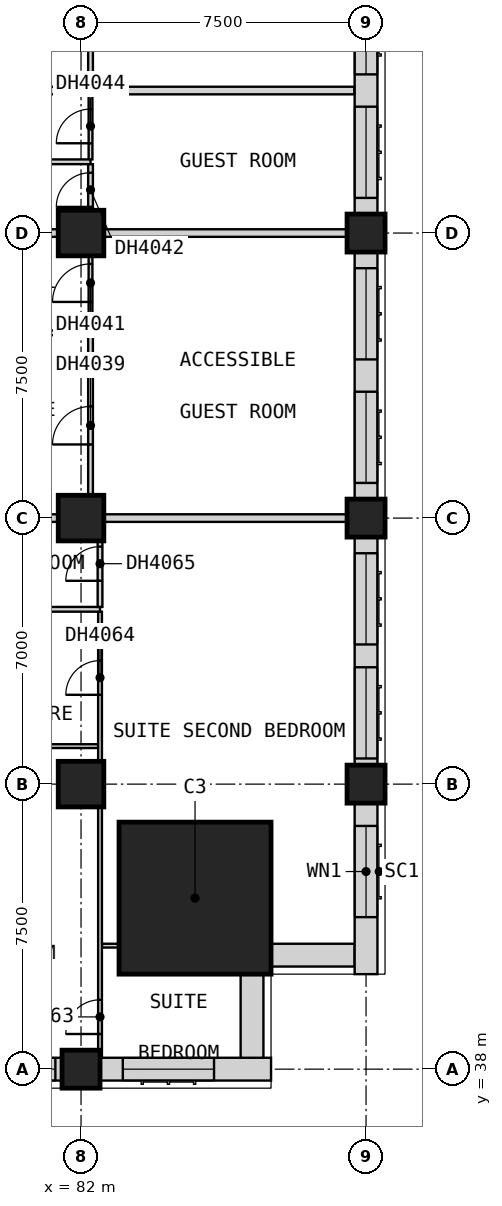
"""IFC4 building model, lengths in metres.
Left out: names, types, materials, properties, quantities, classifications, styles, units other than length and angle.
Written with IfcOpenShell. Run it as: python <this file> out.ifc"""

import sys

from ifc_helpers import new_model, si_unit, direction, frame, frame_2d, origin, origin_2d, place, context, subcontext, project, spatial, rectangle, extrude, element, fill, save


model = new_model("IFC4")
c1 = context("Model", 3, precision=1e-05, world=origin(), true_north=direction((0.0, 1.0)))
c2 = subcontext(c1, "Body", "Model", "MODEL_VIEW")
j1 = project(units=[si_unit("LENGTHUNIT", "METRE"), si_unit("PLANEANGLEUNIT", "RADIAN")], contexts=[c1])
p1 = place(None, origin())
s1 = spatial("IfcSite", under=j1, at=p1, CompositionType="ELEMENT")
p2 = place(p1, origin())
s2 = spatial("IfcBuilding", under=s1, at=p2, CompositionType="ELEMENT")
p3 = place(p2, frame((0.0, 0.0, 44.8)))
s3 = spatial("IfcBuildingStorey", under=s2, at=p3, CompositionType="ELEMENT", Elevation=44.8)
p4 = place(p3, frame((82.0, 38.0, 0.0), z_axis=(0.0, 0.0, 1.0), x_axis=(1.0, 0.0, 0.0)))
e1 = element("IfcColumn", 1, at=p4, inside=s3, PredefinedType="COLUMN", context=c2, shape_type="SweptSolid", body=[
    extrude(rectangle(XDim=1.0, YDim=1.0, at=origin_2d()), origin(), (0.0, 0.0, 1.0), 3.6),
])
for number, where, z_axis, x_axis in (
    (2, (82.0, 45.5, 0.0), (0.0, 0.0, 1.0), (1.0, 0.0, 0.0)),
    (3, (82.0, 52.5, 0.0), (0.0, 0.0, 1.0), (1.0, 0.0, 0.0)),
    (4, (82.0, 60.0, 0.0), (0.0, 0.0, 1.0), (1.0, 0.0, 0.0)),
):
    element("IfcColumn", number, at=place(p3, frame(where, z_axis=z_axis, x_axis=x_axis)), inside=s3, PredefinedType="COLUMN", context=c2, shape_type="SweptSolid", body=[
        extrude(rectangle(XDim=1.2, YDim=1.2, at=origin_2d()), origin(), (0.0, 0.0, 1.0), 3.6),
    ])
for number, where, z_axis, x_axis in (
    (5, (89.5, 45.5, 0.0), (0.0, 0.0, 1.0), (1.0, 0.0, 0.0)),
    (6, (89.5, 52.5, 0.0), (0.0, 0.0, 1.0), (1.0, 0.0, 0.0)),
    (7, (89.5, 60.0, 0.0), (0.0, 0.0, 1.0), (1.0, 0.0, 0.0)),
):
    element("IfcColumn", number, at=place(p3, frame(where, z_axis=z_axis, x_axis=x_axis)), inside=s3, PredefinedType="COLUMN", context=c2, shape_type="SweptSolid", body=[
        extrude(rectangle(XDim=1.0, YDim=1.0, at=origin_2d()), origin(), (0.0, 0.0, 1.0), 3.6),
    ])
p5 = place(p3, frame((85.0, 42.5, 0.0), z_axis=(0.0, 0.0, 1.0), x_axis=(1.0, 0.0, 0.0)))
e8 = element("IfcColumn", 8, at=p5, inside=s3, PredefinedType="COLUMN", context=c2, shape_type="SweptSolid", body=[
    extrude(rectangle(XDim=4.0, YDim=4.0, at=origin_2d()), origin(), (0.0, 0.0, 1.0), 3.6),
])
p6 = place(p3, frame((75.0, 38.0, 0.0), z_axis=(0.0, 0.0, 1.0), x_axis=(1.0, 0.0, 0.0)))
e9 = element("IfcWall", 9, at=p6, inside=s3, PredefinedType="SOLIDWALL", context=c2, shape_type="SweptSolid", body=[
    extrude(rectangle(XDim=6.5, YDim=0.6, at=frame_2d((3.25, 0.0))), origin(), (0.0, 0.0, 1.0), 2.85),
])
p7 = place(p6, frame((0.675, 0.0, 0.8)))
e10 = element("IfcOpeningElement", 10, at=p7, cuts=e9, PredefinedType="OPENING", context=c2, shape_type="SweptSolid", body=[
    extrude(rectangle(XDim=2.4, YDim=1.8, at=frame_2d((1.2, 0.9))), frame((0.0, 0.31, 0.0), z_axis=(0.0, -1.0, 0.0), x_axis=(1.0, 0.0, 0.0)), (0.0, 0.0, 1.0), 0.62),
])
p8 = place(p6, frame((3.925, 0.0, 0.8)))
e11 = element("IfcOpeningElement", 11, at=p8, cuts=e9, PredefinedType="OPENING", context=c2, shape_type="SweptSolid", body=[
    extrude(rectangle(XDim=2.4, YDim=1.8, at=frame_2d((1.2, 0.9))), frame((0.0, 0.31, 0.0), z_axis=(0.0, -1.0, 0.0), x_axis=(1.0, 0.0, 0.0)), (0.0, 0.0, 1.0), 0.62),
])
p9 = place(p3, frame((82.5, 38.0, 0.0), z_axis=(0.0, 0.0, 1.0), x_axis=(1.0, 0.0, 0.0)))
e12 = element("IfcWall", 12, at=p9, inside=s3, PredefinedType="SOLIDWALL", context=c2, shape_type="SweptSolid", body=[
    extrude(rectangle(XDim=4.5, YDim=0.6, at=frame_2d((2.25, 0.0))), origin(), (0.0, 0.0, 1.0), 3.35),
])
p10 = place(p9, frame((0.6, 0.0, 0.8)))
e13 = element("IfcOpeningElement", 13, at=p10, cuts=e12, PredefinedType="OPENING", context=c2, shape_type="SweptSolid", body=[
    extrude(rectangle(XDim=2.4, YDim=1.8, at=frame_2d((1.2, 0.9))), frame((0.0, 0.31, 0.0), z_axis=(0.0, -1.0, 0.0), x_axis=(1.0, 0.0, 0.0)), (0.0, 0.0, 1.0), 0.62),
])
for number, where, z_axis, x_axis in (
    (14, (86.5, 38.3, 0.0), (0.0, 0.0, 1.0), (0.0, 1.0, 0.0)),
    (15, (87.0, 41.0, 0.0), (0.0, 0.0, 1.0), (1.0, 0.0, 0.0)),
):
    element("IfcWall", number, at=place(p3, frame(where, z_axis=z_axis, x_axis=x_axis)), inside=s3, PredefinedType="SOLIDWALL", context=c2, shape_type="SweptSolid", body=[
        extrude(rectangle(XDim=2.2, YDim=0.6, at=frame_2d((1.1, 0.0))), origin(), (0.0, 0.0, 1.0), 3.35),
    ])
p11 = place(p3, frame((89.5, 40.5, 0.0), z_axis=(0.0, 0.0, 1.0), x_axis=(0.0, 1.0, 0.0)))
e16 = element("IfcWall", 16, at=p11, inside=s3, PredefinedType="SOLIDWALL", context=c2, shape_type="SweptSolid", body=[
    extrude(rectangle(XDim=4.5, YDim=0.6, at=frame_2d((2.25, 0.0))), origin(), (0.0, 0.0, 1.0), 3.35),
])
p12 = place(p11, frame((1.5, 0.0, 0.8)))
e17 = element("IfcOpeningElement", 17, at=p12, cuts=e16, PredefinedType="OPENING", context=c2, shape_type="SweptSolid", body=[
    extrude(rectangle(XDim=2.4, YDim=1.8, at=frame_2d((1.2, 0.9))), frame((0.0, 0.31, 0.0), z_axis=(0.0, -1.0, 0.0), x_axis=(1.0, 0.0, 0.0)), (0.0, 0.0, 1.0), 0.62),
])
p13 = place(p3, frame((89.5, 46.0, 0.0), z_axis=(0.0, 0.0, 1.0), x_axis=(0.0, 1.0, 0.0)))
e18 = element("IfcWall", 18, at=p13, inside=s3, PredefinedType="SOLIDWALL", context=c2, shape_type="SweptSolid", body=[
    extrude(rectangle(XDim=6.0, YDim=0.6, at=frame_2d((3.0, 0.0))), origin(), (0.0, 0.0, 1.0), 2.85),
])
p14 = place(p13, frame((0.175, 0.0, 0.8)))
e19 = element("IfcOpeningElement", 19, at=p14, cuts=e18, PredefinedType="OPENING", context=c2, shape_type="SweptSolid", body=[
    extrude(rectangle(XDim=2.4, YDim=1.8, at=frame_2d((1.2, 0.9))), frame((0.0, 0.31, 0.0), z_axis=(0.0, -1.0, 0.0), x_axis=(1.0, 0.0, 0.0)), (0.0, 0.0, 1.0), 0.62),
])
p15 = place(p13, frame((3.175, 0.0, 0.8)))
e20 = element("IfcOpeningElement", 20, at=p15, cuts=e18, PredefinedType="OPENING", context=c2, shape_type="SweptSolid", body=[
    extrude(rectangle(XDim=2.4, YDim=1.8, at=frame_2d((1.2, 0.9))), frame((0.0, 0.31, 0.0), z_axis=(0.0, -1.0, 0.0), x_axis=(1.0, 0.0, 0.0)), (0.0, 0.0, 1.0), 0.62),
])
p16 = place(p3, frame((89.5, 53.0, 0.0), z_axis=(0.0, 0.0, 1.0), x_axis=(0.0, 1.0, 0.0)))
e21 = element("IfcWall", 21, at=p16, inside=s3, PredefinedType="SOLIDWALL", context=c2, shape_type="SweptSolid", body=[
    extrude(rectangle(XDim=6.5, YDim=0.6, at=frame_2d((3.25, 0.0))), origin(), (0.0, 0.0, 1.0), 2.85),
])
p17 = place(p16, frame((0.425, 0.0, 0.8)))
e22 = element("IfcOpeningElement", 22, at=p17, cuts=e21, PredefinedType="OPENING", context=c2, shape_type="SweptSolid", body=[
    extrude(rectangle(XDim=2.4, YDim=1.8, at=frame_2d((1.2, 0.9))), frame((0.0, 0.31, 0.0), z_axis=(0.0, -1.0, 0.0), x_axis=(1.0, 0.0, 0.0)), (0.0, 0.0, 1.0), 0.62),
])
p18 = place(p16, frame((3.675, 0.0, 0.8)))
e23 = element("IfcOpeningElement", 23, at=p18, cuts=e21, PredefinedType="OPENING", context=c2, shape_type="SweptSolid", body=[
    extrude(rectangle(XDim=2.4, YDim=1.8, at=frame_2d((1.2, 0.9))), frame((0.0, 0.31, 0.0), z_axis=(0.0, -1.0, 0.0), x_axis=(1.0, 0.0, 0.0)), (0.0, 0.0, 1.0), 0.62),
])
p19 = place(p3, frame((89.5, 60.5, 0.0), z_axis=(0.0, 0.0, 1.0), x_axis=(0.0, 1.0, 0.0)))
e24 = element("IfcWall", 24, at=p19, inside=s3, PredefinedType="SOLIDWALL", context=c2, shape_type="SweptSolid", body=[
    extrude(rectangle(XDim=6.5, YDim=0.6, at=frame_2d((3.25, 0.0))), origin(), (0.0, 0.0, 1.0), 2.85),
])
p20 = place(p19, frame((0.425, 0.0, 0.8)))
e25 = element("IfcOpeningElement", 25, at=p20, cuts=e24, PredefinedType="OPENING", context=c2, shape_type="SweptSolid", body=[
    extrude(rectangle(XDim=2.4, YDim=1.8, at=frame_2d((1.2, 0.9))), frame((0.0, 0.31, 0.0), z_axis=(0.0, -1.0, 0.0), x_axis=(1.0, 0.0, 0.0)), (0.0, 0.0, 1.0), 0.62),
])
p21 = place(p19, frame((3.675, 0.0, 0.8)))
e26 = element("IfcOpeningElement", 26, at=p21, cuts=e24, PredefinedType="OPENING", context=c2, shape_type="SweptSolid", body=[
    extrude(rectangle(XDim=2.4, YDim=1.8, at=frame_2d((1.2, 0.9))), frame((0.0, 0.31, 0.0), z_axis=(0.0, -1.0, 0.0), x_axis=(1.0, 0.0, 0.0)), (0.0, 0.0, 1.0), 0.62),
])
for number, where, z_axis, x_axis in (
    (27, (77.475, 52.5, 0.0), (0.0, 0.0, 1.0), (1.0, 0.0, 0.0)),
    (28, (77.475, 60.0, 0.0), (0.0, 0.0, 1.0), (1.0, 0.0, 0.0)),
):
    element("IfcWall", number, at=place(p3, frame(where, z_axis=z_axis, x_axis=x_axis)), inside=s3, PredefinedType="PARTITIONING", context=c2, shape_type="SweptSolid", body=[
        extrude(rectangle(XDim=12.525, YDim=0.2, at=frame_2d((6.262, 0.0))), origin(), (0.0, 0.0, 1.0), 3.35),
    ])
p22 = place(p3, frame((77.475, 63.75, 0.0), z_axis=(0.0, 0.0, 1.0), x_axis=(1.0, 0.0, 0.0)))
e29 = element("IfcWall", 29, at=p22, inside=s3, PredefinedType="PARTITIONING", context=c2, shape_type="SweptSolid", body=[
    extrude(rectangle(XDim=11.715, YDim=0.2, at=frame_2d((5.857, 0.0))), origin(), (0.0, 0.0, 1.0), 3.35),
])
p23 = place(p3, frame((82.55, 41.25, 0.0), z_axis=(0.0, 0.0, 1.0), x_axis=(1.0, 0.0, 0.0)))
e30 = element("IfcWall", 30, at=p23, inside=s3, PredefinedType="PARTITIONING", context=c2, shape_type="SweptSolid", body=[
    extrude(rectangle(XDim=4.44, YDim=0.1, at=frame_2d((2.22, 0.0))), origin(), (0.0, 0.0, 1.0), 3.35),
])
p24 = place(p3, frame((75.1, 46.5, 0.0), z_axis=(0.0, 0.0, 1.0), x_axis=(1.0, 0.0, 0.0)))
e31 = element("IfcWall", 31, at=p24, inside=s3, PredefinedType="PARTITIONING", context=c2, shape_type="SweptSolid", body=[
    extrude(rectangle(XDim=7.35, YDim=0.1, at=frame_2d((3.675, 0.0))), origin(), (0.0, 0.0, 1.0), 3.35),
])
p25 = place(p24, frame((0.65, 0.0, 0.0)))
e32 = element("IfcOpeningElement", 32, at=p25, cuts=e31, PredefinedType="OPENING", context=c2, shape_type="SweptSolid", body=[
    extrude(rectangle(XDim=0.9, YDim=2.1, at=frame_2d((0.45, 1.05))), frame((0.0, 0.06, 0.0), z_axis=(0.0, -1.0, 0.0), x_axis=(1.0, 0.0, 0.0)), (0.0, 0.0, 1.0), 0.12),
])
p26 = place(p3, frame((82.25, 57.438, 0.0), z_axis=(0.0, 0.0, 1.0), x_axis=(0.0, 1.0, 0.0)))
e33 = element("IfcWall", 33, at=p26, inside=s3, PredefinedType="PARTITIONING", context=c2, shape_type="SweptSolid", body=[
    extrude(rectangle(XDim=2.462, YDim=0.1, at=frame_2d((1.231, 0.0))), origin(), (0.0, 0.0, 1.0), 3.35),
])
p27 = place(p26, frame((0.75, 0.0, 0.0)))
e34 = element("IfcOpeningElement", 34, at=p27, cuts=e33, PredefinedType="OPENING", context=c2, shape_type="SweptSolid", body=[
    extrude(rectangle(XDim=1.0, YDim=2.1, at=frame_2d((0.5, 1.05))), frame((0.0, 0.06, 0.0), z_axis=(0.0, -1.0, 0.0), x_axis=(1.0, 0.0, 0.0)), (0.0, 0.0, 1.0), 0.12),
])
p28 = place(p3, frame((82.25, 61.938, 0.0), z_axis=(0.0, 0.0, 1.0), x_axis=(0.0, 1.0, 0.0)))
e35 = element("IfcWall", 35, at=p28, inside=s3, PredefinedType="PARTITIONING", context=c2, shape_type="SweptSolid", body=[
    extrude(rectangle(XDim=1.712, YDim=0.1, at=frame_2d((0.856, 0.0))), origin(), (0.0, 0.0, 1.0), 3.35),
])
p29 = place(p28, frame((0.425, 0.0, 0.0)))
e36 = element("IfcOpeningElement", 36, at=p29, cuts=e35, PredefinedType="OPENING", context=c2, shape_type="SweptSolid", body=[
    extrude(rectangle(XDim=0.9, YDim=2.1, at=frame_2d((0.45, 1.05))), frame((0.0, 0.06, 0.0), z_axis=(0.0, -1.0, 0.0), x_axis=(1.0, 0.0, 0.0)), (0.0, 0.0, 1.0), 0.12),
])
p30 = place(p3, frame((82.5, 38.31, 0.0), z_axis=(0.0, 0.0, 1.0), x_axis=(0.0, 1.0, 0.0)))
e37 = element("IfcWall", 37, at=p30, inside=s3, PredefinedType="PARTITIONING", context=c2, shape_type="SweptSolid", body=[
    extrude(rectangle(XDim=11.728, YDim=0.1, at=frame_2d((5.864, 0.0))), origin(), (0.0, 0.0, 1.0), 3.35),
])
p31 = place(p30, frame((0.615, 0.0, 0.0)))
e38 = element("IfcOpeningElement", 38, at=p31, cuts=e37, PredefinedType="OPENING", context=c2, shape_type="SweptSolid", body=[
    extrude(rectangle(XDim=0.9, YDim=2.1, at=frame_2d((0.45, 1.05))), frame((0.0, 0.06, 0.0), z_axis=(0.0, -1.0, 0.0), x_axis=(1.0, 0.0, 0.0)), (0.0, 0.0, 1.0), 0.12),
])
p32 = place(p30, frame((9.54, 0.0, 0.0)))
e39 = element("IfcOpeningElement", 39, at=p32, cuts=e37, PredefinedType="OPENING", context=c2, shape_type="SweptSolid", body=[
    extrude(rectangle(XDim=0.9, YDim=2.1, at=frame_2d((0.45, 1.05))), frame((0.0, 0.06, 0.0), z_axis=(0.0, -1.0, 0.0), x_axis=(1.0, 0.0, 0.0)), (0.0, 0.0, 1.0), 0.12),
])
p33 = place(p3, frame((77.475, 50.1, 0.0), z_axis=(0.0, 0.0, 1.0), x_axis=(1.0, 0.0, 0.0)))
e40 = element("IfcWall", 40, at=p33, inside=s3, PredefinedType="PARTITIONING", context=c2, shape_type="SweptSolid", body=[
    extrude(rectangle(XDim=5.025, YDim=0.125, at=frame_2d((2.512, 0.0))), origin(), (0.0, 0.0, 1.0), 3.35),
])
for number, where, z_axis, x_axis in (
    (41, (77.475, 57.375, 0.0), (0.0, 0.0, 1.0), (1.0, 0.0, 0.0)),
    (42, (77.475, 61.875, 0.0), (0.0, 0.0, 1.0), (1.0, 0.0, 0.0)),
):
    element("IfcWall", number, at=place(p3, frame(where, z_axis=z_axis, x_axis=x_axis)), inside=s3, PredefinedType="PARTITIONING", context=c2, shape_type="SweptSolid", body=[
        extrude(rectangle(XDim=4.775, YDim=0.125, at=frame_2d((2.387, 0.0))), origin(), (0.0, 0.0, 1.0), 3.35),
    ])
p34 = place(p3, frame((82.25, 52.6, 0.0), z_axis=(0.0, 0.0, 1.0), x_axis=(0.0, 1.0, 0.0)))
e43 = element("IfcWall", 43, at=p34, inside=s3, PredefinedType="PARTITIONING", context=c2, shape_type="SweptSolid", body=[
    extrude(rectangle(XDim=4.712, YDim=0.125, at=frame_2d((2.356, 0.0))), origin(), (0.0, 0.0, 1.0), 3.35),
])
p35 = place(p34, frame((1.837, 0.0, 0.0)))
e44 = element("IfcOpeningElement", 44, at=p35, cuts=e43, PredefinedType="OPENING", context=c2, shape_type="SweptSolid", body=[
    extrude(rectangle(XDim=1.0, YDim=2.1, at=frame_2d((0.5, 1.05))), frame((0.0, 0.073, 0.0), z_axis=(0.0, -1.0, 0.0), x_axis=(1.0, 0.0, 0.0)), (0.0, 0.0, 1.0), 0.145),
])
p36 = place(p3, frame((82.25, 60.1, 0.0), z_axis=(0.0, 0.0, 1.0), x_axis=(0.0, 1.0, 0.0)))
e45 = element("IfcWall", 45, at=p36, inside=s3, PredefinedType="PARTITIONING", context=c2, shape_type="SweptSolid", body=[
    extrude(rectangle(XDim=1.712, YDim=0.125, at=frame_2d((0.856, 0.0))), origin(), (0.0, 0.0, 1.0), 3.35),
])
p37 = place(p36, frame((0.587, 0.0, 0.0)))
e46 = element("IfcOpeningElement", 46, at=p37, cuts=e45, PredefinedType="OPENING", context=c2, shape_type="SweptSolid", body=[
    extrude(rectangle(XDim=0.9, YDim=2.1, at=frame_2d((0.45, 1.05))), frame((0.0, 0.073, 0.0), z_axis=(0.0, -1.0, 0.0), x_axis=(1.0, 0.0, 0.0)), (0.0, 0.0, 1.0), 0.145),
])
p38 = place(p3, frame((82.25, 63.85, 0.0), z_axis=(0.0, 0.0, 1.0), x_axis=(0.0, 1.0, 0.0)))
e47 = element("IfcWall", 47, at=p38, inside=s3, PredefinedType="PARTITIONING", context=c2, shape_type="SweptSolid", body=[
    extrude(rectangle(XDim=4.337, YDim=0.125, at=frame_2d((2.169, 0.0))), origin(), (0.0, 0.0, 1.0), 3.35),
])
p39 = place(p38, frame((1.7, 0.0, 0.0)))
e48 = element("IfcOpeningElement", 48, at=p39, cuts=e47, PredefinedType="OPENING", context=c2, shape_type="SweptSolid", body=[
    extrude(rectangle(XDim=0.9, YDim=2.1, at=frame_2d((0.45, 1.05))), frame((0.0, 0.073, 0.0), z_axis=(0.0, -1.0, 0.0), x_axis=(1.0, 0.0, 0.0)), (0.0, 0.0, 1.0), 0.145),
])
p40 = place(p3, frame((82.5, 50.163, 0.0), z_axis=(0.0, 0.0, 1.0), x_axis=(0.0, 1.0, 0.0)))
e49 = element("IfcWall", 49, at=p40, inside=s3, PredefinedType="PARTITIONING", context=c2, shape_type="SweptSolid", body=[
    extrude(rectangle(XDim=2.237, YDim=0.125, at=frame_2d((1.119, 0.0))), origin(), (0.0, 0.0, 1.0), 3.35),
])
p41 = place(p40, frame((0.688, 0.0, 0.0)))
e50 = element("IfcOpeningElement", 50, at=p41, cuts=e49, PredefinedType="OPENING", context=c2, shape_type="SweptSolid", body=[
    extrude(rectangle(XDim=0.9, YDim=2.1, at=frame_2d((0.45, 1.05))), frame((0.0, 0.073, 0.0), z_axis=(0.0, -1.0, 0.0), x_axis=(1.0, 0.0, 0.0)), (0.0, 0.0, 1.0), 0.145),
])
p42 = place(p8, origin())
e51 = element("IfcWindow", 51, at=p42, inside=s3, PartitioningType="SINGLE_PANEL", PredefinedType="WINDOW", context=c2, shape_type="SweptSolid", body=[
    extrude(rectangle(XDim=2.4, YDim=1.8, at=frame_2d((1.2, 0.9))), frame((0.0, -0.07, 0.0), z_axis=(0.0, -1.0, 0.0), x_axis=(1.0, 0.0, 0.0)), (0.0, 0.0, 1.0), 0.06),
])
fill(e11, e51)
p43 = place(p10, origin())
e52 = element("IfcWindow", 52, at=p43, inside=s3, PartitioningType="SINGLE_PANEL", PredefinedType="WINDOW", context=c2, shape_type="SweptSolid", body=[
    extrude(rectangle(XDim=2.4, YDim=1.8, at=frame_2d((1.2, 0.9))), frame((0.0, -0.07, 0.0), z_axis=(0.0, -1.0, 0.0), x_axis=(1.0, 0.0, 0.0)), (0.0, 0.0, 1.0), 0.06),
])
fill(e13, e52)
p44 = place(p12, origin())
e53 = element("IfcWindow", 53, at=p44, inside=s3, PartitioningType="SINGLE_PANEL", PredefinedType="WINDOW", context=c2, shape_type="SweptSolid", body=[
    extrude(rectangle(XDim=2.4, YDim=1.8, at=frame_2d((1.2, 0.9))), frame((0.0, -0.07, 0.0), z_axis=(0.0, -1.0, 0.0), x_axis=(1.0, 0.0, 0.0)), (0.0, 0.0, 1.0), 0.06),
])
fill(e17, e53)
p45 = place(p14, origin())
e54 = element("IfcWindow", 54, at=p45, inside=s3, PartitioningType="SINGLE_PANEL", PredefinedType="WINDOW", context=c2, shape_type="SweptSolid", body=[
    extrude(rectangle(XDim=2.4, YDim=1.8, at=frame_2d((1.2, 0.9))), frame((0.0, -0.07, 0.0), z_axis=(0.0, -1.0, 0.0), x_axis=(1.0, 0.0, 0.0)), (0.0, 0.0, 1.0), 0.06),
])
fill(e19, e54)
p46 = place(p15, origin())
e55 = element("IfcWindow", 55, at=p46, inside=s3, PartitioningType="SINGLE_PANEL", PredefinedType="WINDOW", context=c2, shape_type="SweptSolid", body=[
    extrude(rectangle(XDim=2.4, YDim=1.8, at=frame_2d((1.2, 0.9))), frame((0.0, -0.07, 0.0), z_axis=(0.0, -1.0, 0.0), x_axis=(1.0, 0.0, 0.0)), (0.0, 0.0, 1.0), 0.06),
])
fill(e20, e55)
p47 = place(p17, origin())
e56 = element("IfcWindow", 56, at=p47, inside=s3, PartitioningType="SINGLE_PANEL", PredefinedType="WINDOW", context=c2, shape_type="SweptSolid", body=[
    extrude(rectangle(XDim=2.4, YDim=1.8, at=frame_2d((1.2, 0.9))), frame((0.0, -0.07, 0.0), z_axis=(0.0, -1.0, 0.0), x_axis=(1.0, 0.0, 0.0)), (0.0, 0.0, 1.0), 0.06),
])
fill(e22, e56)
p48 = place(p18, origin())
e57 = element("IfcWindow", 57, at=p48, inside=s3, PartitioningType="SINGLE_PANEL", PredefinedType="WINDOW", context=c2, shape_type="SweptSolid", body=[
    extrude(rectangle(XDim=2.4, YDim=1.8, at=frame_2d((1.2, 0.9))), frame((0.0, -0.07, 0.0), z_axis=(0.0, -1.0, 0.0), x_axis=(1.0, 0.0, 0.0)), (0.0, 0.0, 1.0), 0.06),
])
fill(e23, e57)
p49 = place(p20, origin())
e58 = element("IfcWindow", 58, at=p49, inside=s3, PartitioningType="SINGLE_PANEL", PredefinedType="WINDOW", context=c2, shape_type="SweptSolid", body=[
    extrude(rectangle(XDim=2.4, YDim=1.8, at=frame_2d((1.2, 0.9))), frame((0.0, -0.07, 0.0), z_axis=(0.0, -1.0, 0.0), x_axis=(1.0, 0.0, 0.0)), (0.0, 0.0, 1.0), 0.06),
])
fill(e25, e58)
p50 = place(p21, origin())
e59 = element("IfcWindow", 59, at=p50, inside=s3, PartitioningType="SINGLE_PANEL", PredefinedType="WINDOW", context=c2, shape_type="SweptSolid", body=[
    extrude(rectangle(XDim=2.4, YDim=1.8, at=frame_2d((1.2, 0.9))), frame((0.0, -0.07, 0.0), z_axis=(0.0, -1.0, 0.0), x_axis=(1.0, 0.0, 0.0)), (0.0, 0.0, 1.0), 0.06),
])
fill(e26, e59)
p51 = place(p35, origin())
e60 = element("IfcDoor", 60, at=p51, inside=s3, OperationType="SINGLE_SWING_LEFT", PredefinedType="DOOR", context=c2, shape_type="SweptSolid", body=[
    extrude(rectangle(XDim=1.0, YDim=2.1, at=frame_2d((0.5, 1.05))), frame((0.0, 0.025, 0.0), z_axis=(0.0, -1.0, 0.0), x_axis=(1.0, 0.0, 0.0)), (0.0, 0.0, 1.0), 0.05),
])
fill(e44, e60)
p52 = place(p27, origin())
e61 = element("IfcDoor", 61, at=p52, inside=s3, OperationType="SINGLE_SWING_LEFT", PredefinedType="DOOR", context=c2, shape_type="SweptSolid", body=[
    extrude(rectangle(XDim=1.0, YDim=2.1, at=frame_2d((0.5, 1.05))), frame((0.0, 0.025, 0.0), z_axis=(0.0, -1.0, 0.0), x_axis=(1.0, 0.0, 0.0)), (0.0, 0.0, 1.0), 0.05),
])
fill(e34, e61)
p53 = place(p37, origin())
e62 = element("IfcDoor", 62, at=p53, inside=s3, OperationType="SINGLE_SWING_RIGHT", PredefinedType="DOOR", context=c2, shape_type="SweptSolid", body=[
    extrude(rectangle(XDim=0.9, YDim=2.1, at=frame_2d((0.45, 1.05))), frame((0.0, 0.025, 0.0), z_axis=(0.0, -1.0, 0.0), x_axis=(1.0, 0.0, 0.0)), (0.0, 0.0, 1.0), 0.05),
])
fill(e46, e62)
p54 = place(p29, origin())
e63 = element("IfcDoor", 63, at=p54, inside=s3, OperationType="SINGLE_SWING_LEFT", PredefinedType="DOOR", context=c2, shape_type="SweptSolid", body=[
    extrude(rectangle(XDim=0.9, YDim=2.1, at=frame_2d((0.45, 1.05))), frame((0.0, 0.025, 0.0), z_axis=(0.0, -1.0, 0.0), x_axis=(1.0, 0.0, 0.0)), (0.0, 0.0, 1.0), 0.05),
])
fill(e36, e63)
p55 = place(p31, origin())
e64 = element("IfcDoor", 64, at=p55, inside=s3, OperationType="SINGLE_SWING_LEFT", PredefinedType="DOOR", context=c2, shape_type="SweptSolid", body=[
    extrude(rectangle(XDim=0.9, YDim=2.1, at=frame_2d((0.45, 1.05))), frame((0.0, 0.025, 0.0), z_axis=(0.0, -1.0, 0.0), x_axis=(1.0, 0.0, 0.0)), (0.0, 0.0, 1.0), 0.05),
])
fill(e38, e64)
p56 = place(p32, origin())
e65 = element("IfcDoor", 65, at=p56, inside=s3, OperationType="SINGLE_SWING_RIGHT", PredefinedType="DOOR", context=c2, shape_type="SweptSolid", body=[
    extrude(rectangle(XDim=0.9, YDim=2.1, at=frame_2d((0.45, 1.05))), frame((0.0, 0.025, 0.0), z_axis=(0.0, -1.0, 0.0), x_axis=(1.0, 0.0, 0.0)), (0.0, 0.0, 1.0), 0.05),
])
fill(e39, e65)
p57 = place(p41, origin())
e66 = element("IfcDoor", 66, at=p57, inside=s3, OperationType="SINGLE_SWING_LEFT", PredefinedType="DOOR", context=c2, shape_type="SweptSolid", body=[
    extrude(rectangle(XDim=0.9, YDim=2.1, at=frame_2d((0.45, 1.05))), frame((0.0, 0.025, 0.0), z_axis=(0.0, -1.0, 0.0), x_axis=(1.0, 0.0, 0.0)), (0.0, 0.0, 1.0), 0.05),
])
fill(e50, e66)
save(model, sys.argv[1])
